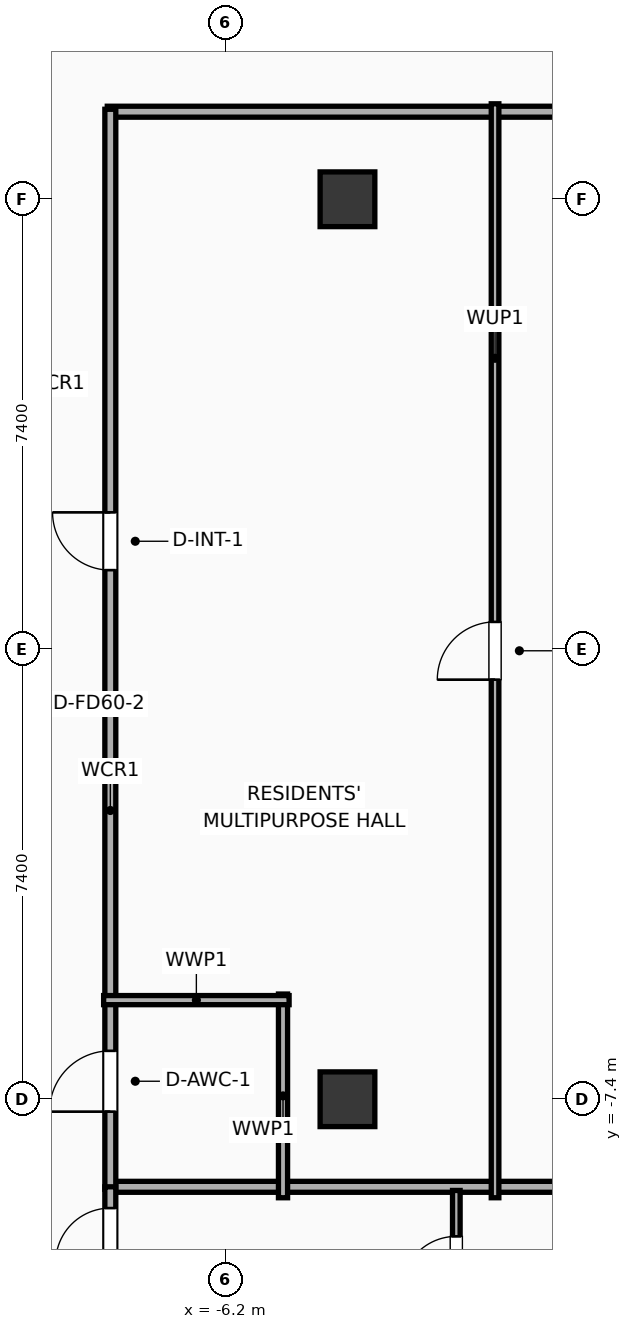
"""IFC4 building model, lengths in metres.
Left out: names, types, materials, properties, quantities, classifications, styles, units other than length and angle.
Written with IfcOpenShell. Run it as: python <this file> out.ifc"""

import sys

from ifc_helpers import new_model, si_unit, direction, frame, frame_2d, origin, origin_2d, place, context, subcontext, project, spatial, rectangle, extrude, element, fill, save


model = new_model("IFC4")
c1 = context("Model", 3, precision=1e-05, world=origin(), true_north=direction((0.0, 1.0)))
c2 = subcontext(c1, "Body", "Model", "MODEL_VIEW")
j1 = project(units=[si_unit("LENGTHUNIT", "METRE"), si_unit("PLANEANGLEUNIT", "RADIAN")], contexts=[c1])
p1 = place(None, origin())
s1 = spatial("IfcSite", under=j1, at=p1, CompositionType="ELEMENT")
p2 = place(p1, origin())
s2 = spatial("IfcBuilding", under=s1, at=p2, CompositionType="ELEMENT")
p3 = place(p2, frame((0.0, 0.0, 306.8)))
s3 = spatial("IfcBuildingStorey", under=s2, at=p3, CompositionType="ELEMENT", Elevation=306.8)
for number, where, z_axis, x_axis in (
    (1, (-4.2, -7.4, 0.0), (0.0, 0.0, 1.0), (1.0, 0.0, 0.0)),
    (2, (-4.2, 7.4, 0.0), (0.0, 0.0, 1.0), (1.0, 0.0, 0.0)),
):
    element("IfcColumn", number, at=place(p3, frame(where, z_axis=z_axis, x_axis=x_axis)), inside=s3, PredefinedType="COLUMN", context=c2, shape_type="SweptSolid", body=[
        extrude(rectangle(XDim=0.9, YDim=0.9, at=origin_2d()), origin(), (0.0, 0.0, 1.0), 3.9),
    ])
p4 = place(p3, frame((-8.15, 8.84, 0.0), z_axis=(0.0, 0.0, 1.0), x_axis=(1.0, 0.0, 0.0)))
e3 = element("IfcWall", 3, at=p4, inside=s3, PredefinedType="PARTITIONING", context=c2, shape_type="SweptSolid", body=[
    extrude(rectangle(XDim=16.3, YDim=0.18, at=frame_2d((8.15, 0.0))), origin(), (0.0, 0.0, 1.0), 3.5),
])
p5 = place(p4, frame((8.49, 0.0, 0.0)))
e4 = element("IfcOpeningElement", 4, at=p5, cuts=e3, PredefinedType="OPENING", context=c2, shape_type="SweptSolid", body=[
    extrude(rectangle(XDim=0.95, YDim=2.05, at=frame_2d((0.475, 1.025))), frame((0.0, 0.1, 0.0), z_axis=(0.0, -1.0, 0.0), x_axis=(1.0, 0.0, 0.0)), (0.0, 0.0, 1.0), 0.2),
])
p6 = place(p3, frame((-8.15, -8.84, 0.0), z_axis=(0.0, 0.0, 1.0), x_axis=(1.0, 0.0, 0.0)))
e5 = element("IfcWall", 5, at=p6, inside=s3, PredefinedType="PARTITIONING", context=c2, shape_type="SweptSolid", body=[
    extrude(rectangle(XDim=16.3, YDim=0.18, at=frame_2d((8.15, 0.0))), origin(), (0.0, 0.0, 1.0), 3.5),
])
p7 = place(p3, frame((-8.1, -8.88, 0.0), z_axis=(0.0, 0.0, 1.0), x_axis=(0.0, 1.0, 0.0)))
e6 = element("IfcWall", 6, at=p7, inside=s3, PredefinedType="PARTITIONING", context=c2, shape_type="SweptSolid", body=[
    extrude(rectangle(XDim=17.76, YDim=0.18, at=frame_2d((8.88, 0.0))), origin(), (0.0, 0.0, 1.0), 3.5),
])
p8 = place(p7, frame((1.276, 0.0, 0.0)))
e7 = element("IfcOpeningElement", 7, at=p8, cuts=e6, PredefinedType="OPENING", context=c2, shape_type="SweptSolid", body=[
    extrude(rectangle(XDim=1.0, YDim=2.05, at=frame_2d((0.5, 1.025))), frame((0.0, 0.1, 0.0), z_axis=(0.0, -1.0, 0.0), x_axis=(1.0, 0.0, 0.0)), (0.0, 0.0, 1.0), 0.2),
])
p9 = place(p7, frame((10.181, 0.0, 0.0)))
e8 = element("IfcOpeningElement", 8, at=p9, cuts=e6, PredefinedType="OPENING", context=c2, shape_type="SweptSolid", body=[
    extrude(rectangle(XDim=0.95, YDim=2.05, at=frame_2d((0.475, 1.025))), frame((0.0, 0.1, 0.0), z_axis=(0.0, -1.0, 0.0), x_axis=(1.0, 0.0, 0.0)), (0.0, 0.0, 1.0), 0.2),
])
p10 = place(p3, frame((-5.26, -9.02, 0.0), z_axis=(0.0, 0.0, 1.0), x_axis=(0.0, 1.0, 0.0)))
e9 = element("IfcWall", 9, at=p10, inside=s3, PredefinedType="PLUMBINGWALL", context=c2, shape_type="SweptSolid", body=[
    extrude(rectangle(XDim=3.35, YDim=0.15, at=frame_2d((1.675, 0.0))), origin(), (0.0, 0.0, 1.0), 3.5),
])
p11 = place(p3, frame((-8.21, -5.77, 0.0), z_axis=(0.0, 0.0, 1.0), x_axis=(1.0, 0.0, 0.0)))
e10 = element("IfcWall", 10, at=p11, inside=s3, PredefinedType="PLUMBINGWALL", context=c2, shape_type="SweptSolid", body=[
    extrude(rectangle(XDim=3.05, YDim=0.15, at=frame_2d((1.525, 0.0))), origin(), (0.0, 0.0, 1.0), 3.5),
])
p12 = place(p3, frame((-1.773, -9.02, 0.0), z_axis=(0.0, 0.0, 1.0), x_axis=(0.0, 1.0, 0.0)))
e11 = element("IfcWall", 11, at=p12, inside=s3, PredefinedType="PARTITIONING", context=c2, shape_type="SweptSolid", body=[
    extrude(rectangle(XDim=17.99, YDim=0.125, at=frame_2d((8.995, 0.0))), origin(), (0.0, 0.0, 1.0), 3.5),
])
p13 = place(p12, frame((8.52, 0.0, 0.0)))
e12 = element("IfcOpeningElement", 12, at=p13, cuts=e11, PredefinedType="OPENING", context=c2, shape_type="SweptSolid", body=[
    extrude(rectangle(XDim=0.95, YDim=2.05, at=frame_2d((0.475, 1.025))), frame((0.0, 0.073, 0.0), z_axis=(0.0, -1.0, 0.0), x_axis=(1.0, 0.0, 0.0)), (0.0, 0.0, 1.0), 0.145),
])
p14 = place(p3, frame((-2.41, -11.31, 0.0), z_axis=(0.0, 0.0, 1.0), x_axis=(0.0, 1.0, 0.0)))
e13 = element("IfcWall", 13, at=p14, inside=s3, PredefinedType="PARTITIONING", context=c2, shape_type="SweptSolid", body=[
    extrude(rectangle(XDim=2.41, YDim=0.125, at=frame_2d((1.205, 0.0))), origin(), (0.0, 0.0, 1.0), 3.5),
])
p15 = place(p14, frame((0.755, 0.0, 0.0)))
e14 = element("IfcOpeningElement", 14, at=p15, cuts=e13, PredefinedType="OPENING", context=c2, shape_type="SweptSolid", body=[
    extrude(rectangle(XDim=0.9, YDim=2.05, at=frame_2d((0.45, 1.025))), frame((0.0, 0.073, 0.0), z_axis=(0.0, -1.0, 0.0), x_axis=(1.0, 0.0, 0.0)), (0.0, 0.0, 1.0), 0.145),
])
p16 = place(p3, frame((-8.1, -18.155, 0.0), z_axis=(0.0, 0.0, 1.0), x_axis=(0.0, 1.0, 0.0)))
e15 = element("IfcWall", 15, at=p16, inside=s3, PredefinedType="PARTITIONING", context=c2, shape_type="SweptSolid", body=[
    extrude(rectangle(XDim=9.314, YDim=0.18, at=frame_2d((4.657, 0.0))), origin(), (0.0, 0.0, 1.0), 3.5),
])
p17 = place(p16, frame((8.064, 0.0, 0.0)))
e16 = element("IfcOpeningElement", 16, at=p17, cuts=e15, PredefinedType="OPENING", context=c2, shape_type="SweptSolid", body=[
    extrude(rectangle(XDim=0.9, YDim=2.05, at=frame_2d((0.45, 1.025))), frame((0.0, 0.1, 0.0), z_axis=(0.0, -1.0, 0.0), x_axis=(1.0, 0.0, 0.0)), (0.0, 0.0, 1.0), 0.2),
])
p18 = place(p8, origin())
e17 = element("IfcDoor", 17, at=p18, inside=s3, OperationType="SINGLE_SWING_LEFT", PredefinedType="DOOR", context=c2, shape_type="SweptSolid", body=[
    extrude(rectangle(XDim=1.0, YDim=2.05, at=frame_2d((0.5, 1.025))), frame((0.0, 0.025, 0.0), z_axis=(0.0, -1.0, 0.0), x_axis=(1.0, 0.0, 0.0)), (0.0, 0.0, 1.0), 0.05),
])
fill(e7, e17)
p19 = place(p9, origin())
e18 = element("IfcDoor", 18, at=p19, inside=s3, OperationType="SINGLE_SWING_RIGHT", PredefinedType="DOOR", context=c2, shape_type="SweptSolid", body=[
    extrude(rectangle(XDim=0.95, YDim=2.05, at=frame_2d((0.475, 1.025))), frame((0.0, 0.025, 0.0), z_axis=(0.0, -1.0, 0.0), x_axis=(1.0, 0.0, 0.0)), (0.0, 0.0, 1.0), 0.05),
])
fill(e8, e18)
p20 = place(p13, origin())
e19 = element("IfcDoor", 19, at=p20, inside=s3, OperationType="SINGLE_SWING_LEFT", PredefinedType="DOOR", context=c2, shape_type="SweptSolid", body=[
    extrude(rectangle(XDim=0.95, YDim=2.05, at=frame_2d((0.475, 1.025))), frame((0.0, 0.025, 0.0), z_axis=(0.0, -1.0, 0.0), x_axis=(1.0, 0.0, 0.0)), (0.0, 0.0, 1.0), 0.05),
])
fill(e12, e19)
p21 = place(p15, origin())
e20 = element("IfcDoor", 20, at=p21, inside=s3, OperationType="SINGLE_SWING_LEFT", PredefinedType="DOOR", context=c2, shape_type="SweptSolid", body=[
    extrude(rectangle(XDim=0.9, YDim=2.05, at=frame_2d((0.45, 1.025))), frame((0.0, 0.025, 0.0), z_axis=(0.0, -1.0, 0.0), x_axis=(1.0, 0.0, 0.0)), (0.0, 0.0, 1.0), 0.05),
])
fill(e14, e20)
p22 = place(p17, origin())
e21 = element("IfcDoor", 21, at=p22, inside=s3, OperationType="SINGLE_SWING_LEFT", PredefinedType="DOOR", context=c2, shape_type="SweptSolid", body=[
    extrude(rectangle(XDim=0.9, YDim=2.05, at=frame_2d((0.45, 1.025))), frame((0.0, 0.025, 0.0), z_axis=(0.0, -1.0, 0.0), x_axis=(1.0, 0.0, 0.0)), (0.0, 0.0, 1.0), 0.05),
])
fill(e16, e21)
save(model, sys.argv[1])
